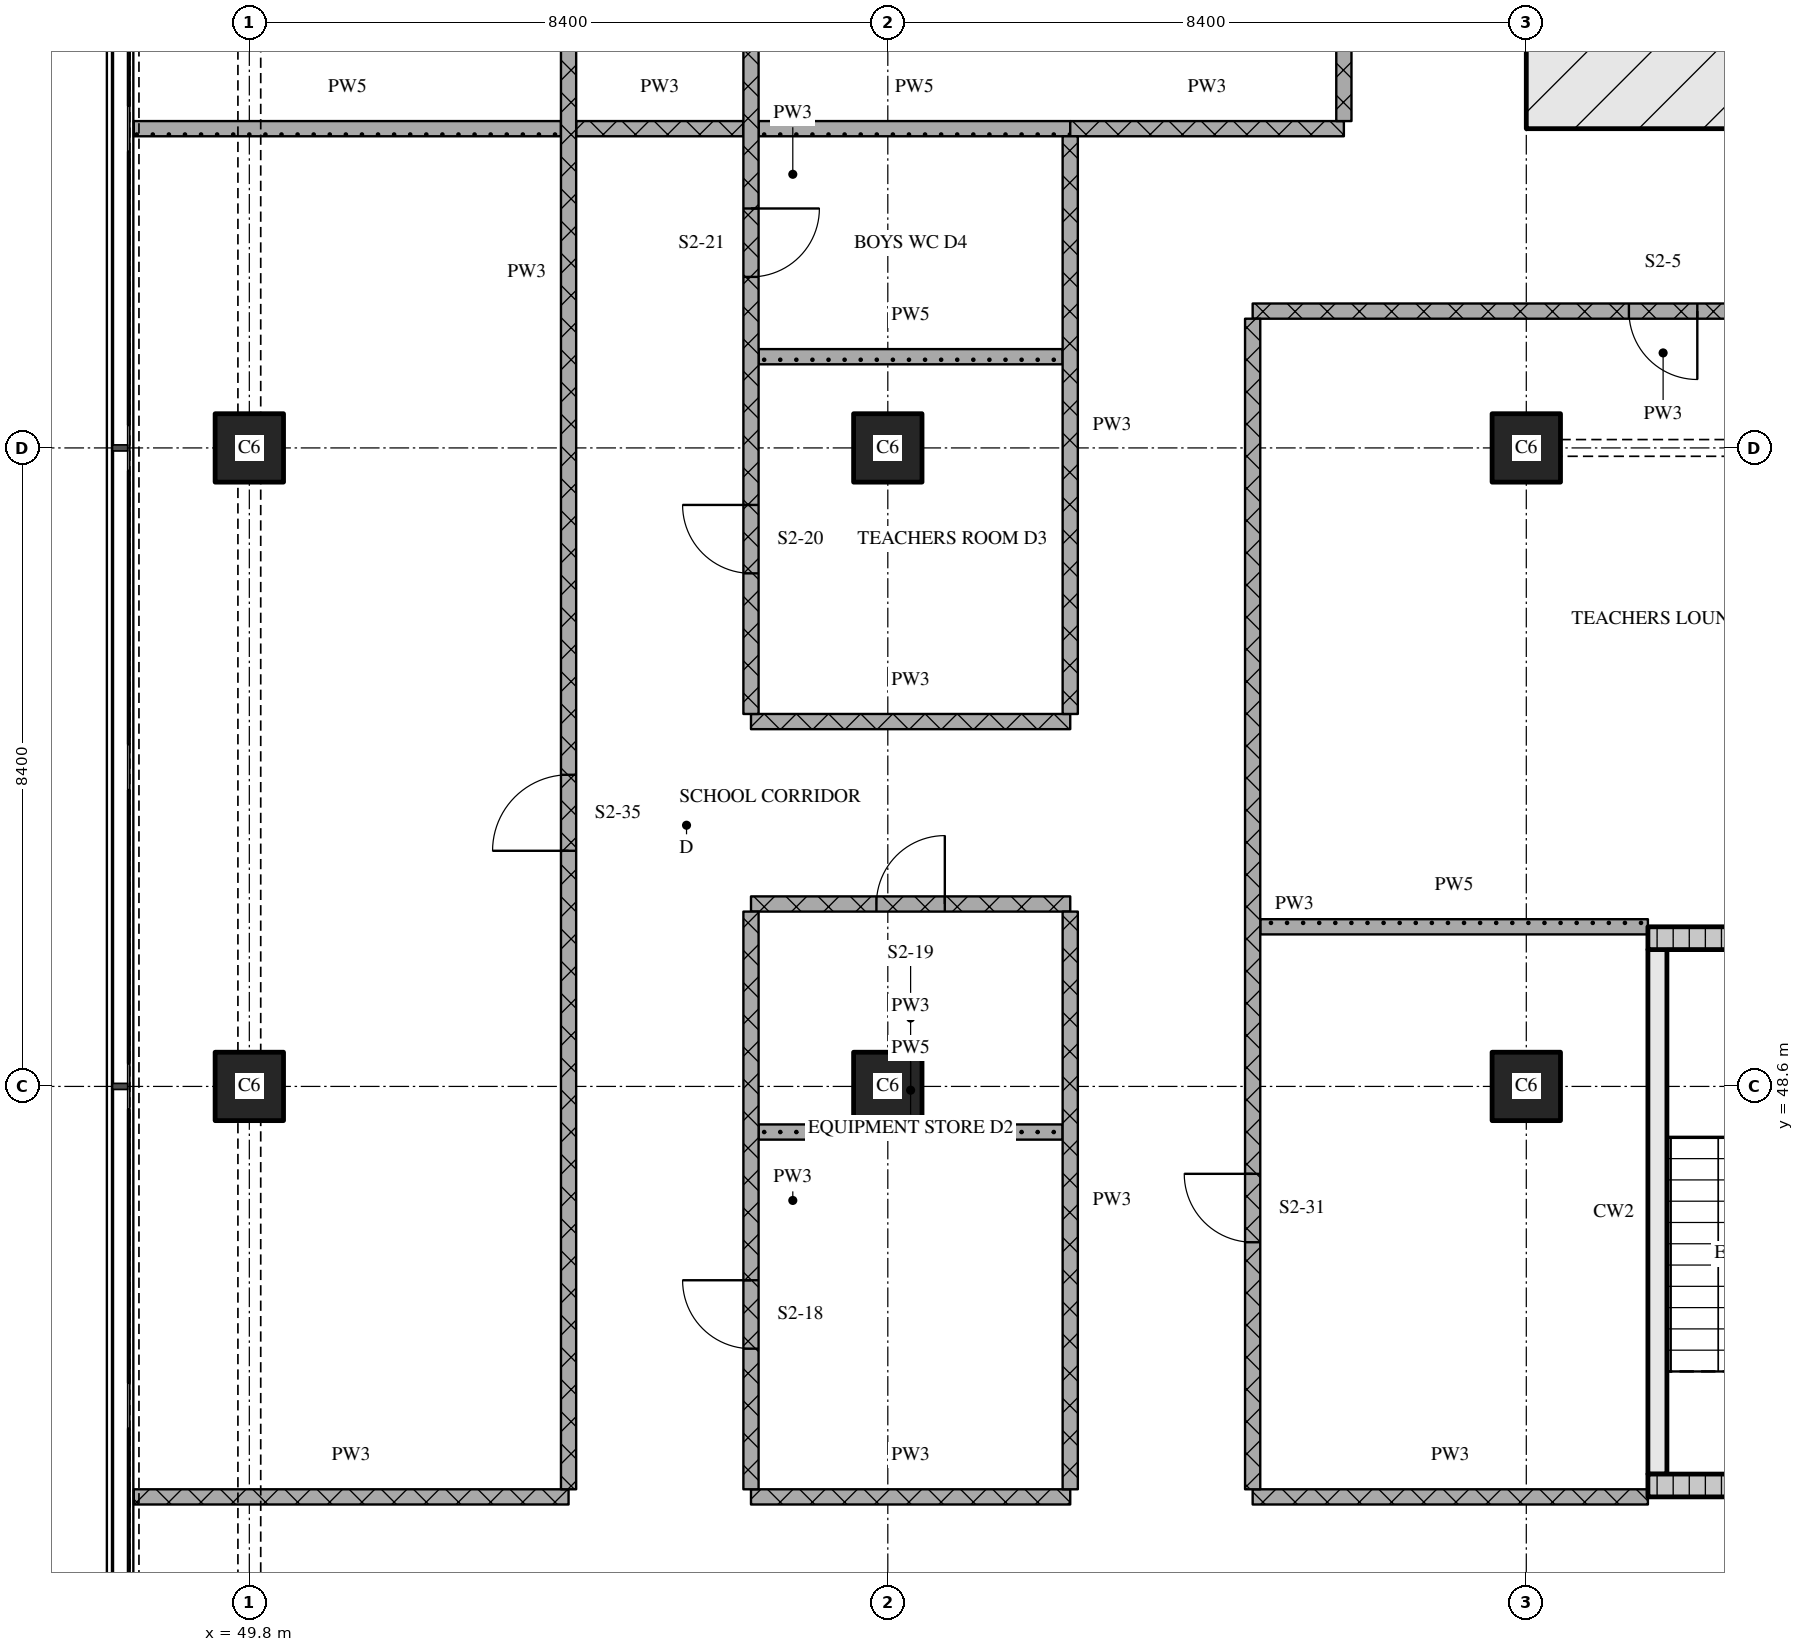
"""IFC4 building model, lengths in metres.
Left out: names, types, materials, properties, quantities, classifications, styles, units other than length and angle.
Written with IfcOpenShell. Run it as: python <this file> out.ifc"""

import sys

from ifc_helpers import new_model, si_unit, direction, frame, frame_2d, origin, origin_2d, place, context, subcontext, project, spatial, rectangle, extrude, element, fill, save


model = new_model("IFC4")
c1 = context("Model", 3, precision=1e-05, world=origin(), true_north=direction((0.0, 1.0)))
c2 = subcontext(c1, "Body", "Model", "MODEL_VIEW")
j1 = project(units=[si_unit("LENGTHUNIT", "METRE"), si_unit("PLANEANGLEUNIT", "RADIAN")], contexts=[c1])
p1 = place(None, origin())
s1 = spatial("IfcSite", under=j1, at=p1, CompositionType="ELEMENT")
p2 = place(p1, origin())
s2 = spatial("IfcBuilding", under=s1, at=p2, CompositionType="ELEMENT")
p3 = place(p2, frame((0.0, 0.0, 28.2)))
s3 = spatial("IfcBuildingStorey", under=s2, at=p3, CompositionType="ELEMENT", Elevation=28.2)
for number, where, z_axis, x_axis in (
    (1, (49.8, 48.6, 0.0), (0.0, 0.0, 1.0), (1.0, 0.0, 0.0)),
    (2, (49.8, 57.0, 0.0), (0.0, 0.0, 1.0), (1.0, 0.0, 0.0)),
    (3, (58.2, 48.6, 0.0), (0.0, 0.0, 1.0), (1.0, 0.0, 0.0)),
    (4, (58.2, 57.0, 0.0), (0.0, 0.0, 1.0), (1.0, 0.0, 0.0)),
    (5, (66.6, 48.6, 0.0), (0.0, 0.0, 1.0), (1.0, 0.0, 0.0)),
    (6, (66.6, 57.0, 0.0), (0.0, 0.0, 1.0), (1.0, 0.0, 0.0)),
):
    element("IfcColumn", number, at=place(p3, frame(where, z_axis=z_axis, x_axis=x_axis)), inside=s3, PredefinedType="COLUMN", context=c2, shape_type="SweptSolid", body=[
        extrude(rectangle(XDim=0.9, YDim=0.9, at=origin_2d()), origin(), (0.0, 0.0, 1.0), 4.5),
    ])
p4 = place(p3, frame((66.6, 61.8, 0.0), z_axis=(0.0, 0.0, 1.0), x_axis=(1.0, 0.0, 0.0)))
e7 = element("IfcWall", 7, at=p4, inside=s3, PredefinedType="SOLIDWALL", context=c2, shape_type="SweptSolid", body=[
    extrude(rectangle(XDim=42.0, YDim=1.2, at=frame_2d((21.0, 0.0))), origin(), (0.0, 0.0, 1.0), 4.2),
])
p5 = place(p4, frame((21.35, 0.0, 0.0)))
e8 = element("IfcOpeningElement", 8, at=p5, cuts=e7, PredefinedType="OPENING", context=c2, shape_type="SweptSolid", body=[
    extrude(rectangle(XDim=1.8, YDim=2.1, at=frame_2d((0.9, 1.05))), frame((0.0, 0.61, 0.0), z_axis=(0.0, -1.0, 0.0), x_axis=(1.0, 0.0, 0.0)), (0.0, 0.0, 1.0), 1.22),
])
p6 = place(p3, frame((68.2, 43.35, 0.0), z_axis=(0.0, 0.0, 1.0), x_axis=(1.0, 0.0, 0.0)))
e9 = element("IfcWall", 9, at=p6, inside=s3, PredefinedType="SOLIDWALL", context=c2, shape_type="SweptSolid", body=[
    extrude(rectangle(XDim=5.6, YDim=0.3, at=frame_2d((2.8, 0.0))), origin(), (0.0, 0.0, 1.0), 4.2),
])
p7 = place(p6, frame((3.875, 0.0, 0.0)))
e10 = element("IfcOpeningElement", 10, at=p7, cuts=e9, PredefinedType="OPENING", context=c2, shape_type="SweptSolid", body=[
    extrude(rectangle(XDim=1.0, YDim=2.1, at=frame_2d((0.5, 1.05))), frame((0.0, 0.16, 0.0), z_axis=(0.0, -1.0, 0.0), x_axis=(1.0, 0.0, 0.0)), (0.0, 0.0, 1.0), 0.32),
])
p8 = place(p3, frame((68.325, 43.5, 0.0), z_axis=(0.0, 0.0, 1.0), x_axis=(0.0, 1.0, 0.0)))
e11 = element("IfcWall", 11, at=p8, inside=s3, PredefinedType="SOLIDWALL", context=c2, shape_type="SweptSolid", body=[
    extrude(rectangle(XDim=6.9, YDim=0.25, at=frame_2d((3.45, 0.0))), origin(), (0.0, 0.0, 1.0), 4.2),
])
p9 = place(p3, frame((68.2, 50.55, 0.0), z_axis=(0.0, 0.0, 1.0), x_axis=(1.0, 0.0, 0.0)))
e12 = element("IfcWall", 12, at=p9, inside=s3, PredefinedType="SOLIDWALL", context=c2, shape_type="SweptSolid", body=[
    extrude(rectangle(XDim=5.6, YDim=0.3, at=frame_2d((2.8, 0.0))), origin(), (0.0, 0.0, 1.0), 4.2),
])
p10 = place(p3, frame((48.28, 43.2, 0.0), z_axis=(0.0, 0.0, 1.0), x_axis=(1.0, 0.0, 0.0)))
e13 = element("IfcWall", 13, at=p10, inside=s3, PredefinedType="PARTITIONING", context=c2, shape_type="SweptSolid", body=[
    extrude(rectangle(XDim=5.72, YDim=0.2, at=frame_2d((2.86, 0.0))), origin(), (0.0, 0.0, 1.0), 4.2),
])
p11 = place(p3, frame((56.4, 43.2, 0.0), z_axis=(0.0, 0.0, 1.0), x_axis=(1.0, 0.0, 0.0)))
e14 = element("IfcWall", 14, at=p11, inside=s3, PredefinedType="PARTITIONING", context=c2, shape_type="SweptSolid", body=[
    extrude(rectangle(XDim=4.2, YDim=0.2, at=frame_2d((2.1, 0.0))), origin(), (0.0, 0.0, 1.0), 4.2),
])
p12 = place(p3, frame((63.0, 43.2, 0.0), z_axis=(0.0, 0.0, 1.0), x_axis=(1.0, 0.0, 0.0)))
e15 = element("IfcWall", 15, at=p12, inside=s3, PredefinedType="PARTITIONING", context=c2, shape_type="SweptSolid", body=[
    extrude(rectangle(XDim=5.2, YDim=0.2, at=frame_2d((2.6, 0.0))), origin(), (0.0, 0.0, 1.0), 4.2),
])
p13 = place(p3, frame((56.5, 48.0, 0.0), z_axis=(0.0, 0.0, 1.0), x_axis=(1.0, 0.0, 0.0)))
e16 = element("IfcWall", 16, at=p13, inside=s3, PredefinedType="PARTITIONING", context=c2, shape_type="SweptSolid", body=[
    extrude(rectangle(XDim=4.0, YDim=0.2, at=frame_2d((2.0, 0.0))), origin(), (0.0, 0.0, 1.0), 4.2),
])
p14 = place(p3, frame((63.1, 50.7, 0.0), z_axis=(0.0, 0.0, 1.0), x_axis=(1.0, 0.0, 0.0)))
e17 = element("IfcWall", 17, at=p14, inside=s3, PredefinedType="PARTITIONING", context=c2, shape_type="SweptSolid", body=[
    extrude(rectangle(XDim=5.1, YDim=0.2, at=frame_2d((2.55, 0.0))), origin(), (0.0, 0.0, 1.0), 4.2),
])
p15 = place(p3, frame((60.6, 51.0, 0.0), z_axis=(0.0, 0.0, 1.0), x_axis=(-1.0, 0.0, 0.0)))
e18 = element("IfcWall", 18, at=p15, inside=s3, PredefinedType="PARTITIONING", context=c2, shape_type="SweptSolid", body=[
    extrude(rectangle(XDim=4.2, YDim=0.2, at=frame_2d((2.1, 0.0))), origin(), (0.0, 0.0, 1.0), 4.2),
])
p16 = place(p15, frame((1.65, 0.0, 0.0)))
e19 = element("IfcOpeningElement", 19, at=p16, cuts=e18, PredefinedType="OPENING", context=c2, shape_type="SweptSolid", body=[
    extrude(rectangle(XDim=0.9, YDim=2.1, at=frame_2d((0.45, 1.05))), frame((0.0, 0.11, 0.0), z_axis=(0.0, -1.0, 0.0), x_axis=(1.0, 0.0, 0.0)), (0.0, 0.0, 1.0), 0.22),
])
p17 = place(p3, frame((56.4, 53.4, 0.0), z_axis=(0.0, 0.0, 1.0), x_axis=(1.0, 0.0, 0.0)))
e20 = element("IfcWall", 20, at=p17, inside=s3, PredefinedType="PARTITIONING", context=c2, shape_type="SweptSolid", body=[
    extrude(rectangle(XDim=4.2, YDim=0.2, at=frame_2d((2.1, 0.0))), origin(), (0.0, 0.0, 1.0), 4.2),
])
p18 = place(p3, frame((56.5, 58.2, 0.0), z_axis=(0.0, 0.0, 1.0), x_axis=(1.0, 0.0, 0.0)))
e21 = element("IfcWall", 21, at=p18, inside=s3, PredefinedType="PARTITIONING", context=c2, shape_type="SweptSolid", body=[
    extrude(rectangle(XDim=4.0, YDim=0.2, at=frame_2d((2.0, 0.0))), origin(), (0.0, 0.0, 1.0), 4.2),
])
p19 = place(p3, frame((73.8, 58.8, 0.0), z_axis=(0.0, 0.0, 1.0), x_axis=(-1.0, 0.0, 0.0)))
e22 = element("IfcWall", 22, at=p19, inside=s3, PredefinedType="PARTITIONING", context=c2, shape_type="SweptSolid", body=[
    extrude(rectangle(XDim=10.8, YDim=0.2, at=frame_2d((5.4, 0.0))), origin(), (0.0, 0.0, 1.0), 4.2),
])
p20 = place(p19, frame((4.95, 0.0, 0.0)))
e23 = element("IfcOpeningElement", 23, at=p20, cuts=e22, PredefinedType="OPENING", context=c2, shape_type="SweptSolid", body=[
    extrude(rectangle(XDim=0.9, YDim=2.1, at=frame_2d((0.45, 1.05))), frame((0.0, 0.11, 0.0), z_axis=(0.0, -1.0, 0.0), x_axis=(1.0, 0.0, 0.0)), (0.0, 0.0, 1.0), 0.22),
])
p21 = place(p3, frame((54.1, 61.2, 0.0), z_axis=(0.0, 0.0, 1.0), x_axis=(1.0, 0.0, 0.0)))
e24 = element("IfcWall", 24, at=p21, inside=s3, PredefinedType="PARTITIONING", context=c2, shape_type="SweptSolid", body=[
    extrude(rectangle(XDim=2.2, YDim=0.2, at=frame_2d((1.1, 0.0))), origin(), (0.0, 0.0, 1.0), 4.2),
])
p22 = place(p3, frame((60.6, 61.2, 0.0), z_axis=(0.0, 0.0, 1.0), x_axis=(1.0, 0.0, 0.0)))
e25 = element("IfcWall", 25, at=p22, inside=s3, PredefinedType="PARTITIONING", context=c2, shape_type="SweptSolid", body=[
    extrude(rectangle(XDim=3.6, YDim=0.2, at=frame_2d((1.8, 0.0))), origin(), (0.0, 0.0, 1.0), 4.2),
])
p23 = place(p3, frame((48.28, 61.2, 0.0), z_axis=(0.0, 0.0, 1.0), x_axis=(1.0, 0.0, 0.0)))
e26 = element("IfcWall", 26, at=p23, inside=s3, PredefinedType="PARTITIONING", context=c2, shape_type="SweptSolid", body=[
    extrude(rectangle(XDim=5.62, YDim=0.2, at=frame_2d((2.81, 0.0))), origin(), (0.0, 0.0, 1.0), 4.2),
])
p24 = place(p3, frame((56.5, 61.2, 0.0), z_axis=(0.0, 0.0, 1.0), x_axis=(1.0, 0.0, 0.0)))
e27 = element("IfcWall", 27, at=p24, inside=s3, PredefinedType="PARTITIONING", context=c2, shape_type="SweptSolid", body=[
    extrude(rectangle(XDim=4.1, YDim=0.2, at=frame_2d((2.05, 0.0))), origin(), (0.0, 0.0, 1.0), 4.2),
])
p25 = place(p3, frame((54.0, 43.3, 0.0), z_axis=(0.0, 0.0, 1.0), x_axis=(0.0, 1.0, 0.0)))
e28 = element("IfcWall", 28, at=p25, inside=s3, PredefinedType="PARTITIONING", context=c2, shape_type="SweptSolid", body=[
    extrude(rectangle(XDim=32.02, YDim=0.2, at=frame_2d((16.01, 0.0))), origin(), (0.0, 0.0, 1.0), 4.2),
])
p26 = place(p25, frame((8.4, 0.0, 0.0)))
e29 = element("IfcOpeningElement", 29, at=p26, cuts=e28, PredefinedType="OPENING", context=c2, shape_type="SweptSolid", body=[
    extrude(rectangle(XDim=1.0, YDim=2.1, at=frame_2d((0.5, 1.05))), frame((0.0, 0.11, 0.0), z_axis=(0.0, -1.0, 0.0), x_axis=(1.0, 0.0, 0.0)), (0.0, 0.0, 1.0), 0.22),
])
p27 = place(p25, frame((23.292, 0.0, 0.0)))
e30 = element("IfcOpeningElement", 30, at=p27, cuts=e28, PredefinedType="OPENING", context=c2, shape_type="SweptSolid", body=[
    extrude(rectangle(XDim=1.0, YDim=2.1, at=frame_2d((0.5, 1.05))), frame((0.0, 0.11, 0.0), z_axis=(0.0, -1.0, 0.0), x_axis=(1.0, 0.0, 0.0)), (0.0, 0.0, 1.0), 0.22),
])
p28 = place(p3, frame((56.4, 50.9, 0.0), z_axis=(0.0, 0.0, 1.0), x_axis=(0.0, -1.0, 0.0)))
e31 = element("IfcWall", 31, at=p28, inside=s3, PredefinedType="PARTITIONING", context=c2, shape_type="SweptSolid", body=[
    extrude(rectangle(XDim=7.6, YDim=0.2, at=frame_2d((3.8, 0.0))), origin(), (0.0, 0.0, 1.0), 4.2),
])
p29 = place(p28, frame((4.85, 0.0, 0.0)))
e32 = element("IfcOpeningElement", 32, at=p29, cuts=e31, PredefinedType="OPENING", context=c2, shape_type="SweptSolid", body=[
    extrude(rectangle(XDim=0.9, YDim=2.1, at=frame_2d((0.45, 1.05))), frame((0.0, 0.11, 0.0), z_axis=(0.0, -1.0, 0.0), x_axis=(1.0, 0.0, 0.0)), (0.0, 0.0, 1.0), 0.22),
])
p30 = place(p3, frame((56.4, 67.7, 0.0), z_axis=(0.0, 0.0, 1.0), x_axis=(0.0, -1.0, 0.0)))
e33 = element("IfcWall", 33, at=p30, inside=s3, PredefinedType="PARTITIONING", context=c2, shape_type="SweptSolid", body=[
    extrude(rectangle(XDim=14.2, YDim=0.2, at=frame_2d((7.1, 0.0))), origin(), (0.0, 0.0, 1.0), 4.2),
])
p31 = place(p30, frame((7.55, 0.0, 0.0)))
e34 = element("IfcOpeningElement", 34, at=p31, cuts=e33, PredefinedType="OPENING", context=c2, shape_type="SweptSolid", body=[
    extrude(rectangle(XDim=0.9, YDim=2.1, at=frame_2d((0.45, 1.05))), frame((0.0, 0.11, 0.0), z_axis=(0.0, -1.0, 0.0), x_axis=(1.0, 0.0, 0.0)), (0.0, 0.0, 1.0), 0.22),
])
p32 = place(p30, frame((11.45, 0.0, 0.0)))
e35 = element("IfcOpeningElement", 35, at=p32, cuts=e33, PredefinedType="OPENING", context=c2, shape_type="SweptSolid", body=[
    extrude(rectangle(XDim=0.9, YDim=2.1, at=frame_2d((0.45, 1.05))), frame((0.0, 0.11, 0.0), z_axis=(0.0, -1.0, 0.0), x_axis=(1.0, 0.0, 0.0)), (0.0, 0.0, 1.0), 0.22),
])
p33 = place(p3, frame((60.6, 50.9, 0.0), z_axis=(0.0, 0.0, 1.0), x_axis=(0.0, -1.0, 0.0)))
e36 = element("IfcWall", 36, at=p33, inside=s3, PredefinedType="PARTITIONING", context=c2, shape_type="SweptSolid", body=[
    extrude(rectangle(XDim=7.6, YDim=0.2, at=frame_2d((3.8, 0.0))), origin(), (0.0, 0.0, 1.0), 4.2),
])
p34 = place(p3, frame((60.6, 61.1, 0.0), z_axis=(0.0, 0.0, 1.0), x_axis=(0.0, -1.0, 0.0)))
e37 = element("IfcWall", 37, at=p34, inside=s3, PredefinedType="PARTITIONING", context=c2, shape_type="SweptSolid", body=[
    extrude(rectangle(XDim=7.6, YDim=0.2, at=frame_2d((3.8, 0.0))), origin(), (0.0, 0.0, 1.0), 4.2),
])
p35 = place(p3, frame((63.0, 58.7, 0.0), z_axis=(0.0, 0.0, 1.0), x_axis=(0.0, -1.0, 0.0)))
e38 = element("IfcWall", 38, at=p35, inside=s3, PredefinedType="PARTITIONING", context=c2, shape_type="SweptSolid", body=[
    extrude(rectangle(XDim=15.4, YDim=0.2, at=frame_2d((7.7, 0.0))), origin(), (0.0, 0.0, 1.0), 4.2),
])
p36 = place(p35, frame((11.25, 0.0, 0.0)))
e39 = element("IfcOpeningElement", 39, at=p36, cuts=e38, PredefinedType="OPENING", context=c2, shape_type="SweptSolid", body=[
    extrude(rectangle(XDim=0.9, YDim=2.1, at=frame_2d((0.45, 1.05))), frame((0.0, 0.11, 0.0), z_axis=(0.0, -1.0, 0.0), x_axis=(1.0, 0.0, 0.0)), (0.0, 0.0, 1.0), 0.22),
])
p37 = place(p3, frame((64.2, 67.7, 0.0), z_axis=(0.0, 0.0, 1.0), x_axis=(0.0, -1.0, 0.0)))
e40 = element("IfcWall", 40, at=p37, inside=s3, PredefinedType="PARTITIONING", context=c2, shape_type="SweptSolid", body=[
    extrude(rectangle(XDim=6.4, YDim=0.2, at=frame_2d((3.2, 0.0))), origin(), (0.0, 0.0, 1.0), 4.2),
])
p38 = place(p16, origin())
e41 = element("IfcDoor", 41, at=p38, inside=s3, OperationType="SINGLE_SWING_RIGHT", PredefinedType="DOOR", context=c2, shape_type="SweptSolid", body=[
    extrude(rectangle(XDim=0.9, YDim=2.1, at=frame_2d((0.45, 1.05))), frame((0.0, 0.025, 0.0), z_axis=(0.0, -1.0, 0.0), x_axis=(1.0, 0.0, 0.0)), (0.0, 0.0, 1.0), 0.05),
])
fill(e19, e41)
p39 = place(p20, origin())
e42 = element("IfcDoor", 42, at=p39, inside=s3, OperationType="SINGLE_SWING_LEFT", PredefinedType="DOOR", context=c2, shape_type="SweptSolid", body=[
    extrude(rectangle(XDim=0.9, YDim=2.1, at=frame_2d((0.45, 1.05))), frame((0.0, 0.025, 0.0), z_axis=(0.0, -1.0, 0.0), x_axis=(1.0, 0.0, 0.0)), (0.0, 0.0, 1.0), 0.05),
])
fill(e23, e42)
p40 = place(p26, origin())
e43 = element("IfcDoor", 43, at=p40, inside=s3, OperationType="SINGLE_SWING_LEFT", PredefinedType="DOOR", context=c2, shape_type="SweptSolid", body=[
    extrude(rectangle(XDim=1.0, YDim=2.1, at=frame_2d((0.5, 1.05))), frame((0.0, 0.025, 0.0), z_axis=(0.0, -1.0, 0.0), x_axis=(1.0, 0.0, 0.0)), (0.0, 0.0, 1.0), 0.05),
])
fill(e29, e43)
p41 = place(p29, origin())
e44 = element("IfcDoor", 44, at=p41, inside=s3, OperationType="SINGLE_SWING_RIGHT", PredefinedType="DOOR", context=c2, shape_type="SweptSolid", body=[
    extrude(rectangle(XDim=0.9, YDim=2.1, at=frame_2d((0.45, 1.05))), frame((0.0, 0.025, 0.0), z_axis=(0.0, -1.0, 0.0), x_axis=(1.0, 0.0, 0.0)), (0.0, 0.0, 1.0), 0.05),
])
fill(e32, e44)
p42 = place(p31, origin())
e45 = element("IfcDoor", 45, at=p42, inside=s3, OperationType="SINGLE_SWING_LEFT", PredefinedType="DOOR", context=c2, shape_type="SweptSolid", body=[
    extrude(rectangle(XDim=0.9, YDim=2.1, at=frame_2d((0.45, 1.05))), frame((0.0, 0.025, 0.0), z_axis=(0.0, -1.0, 0.0), x_axis=(1.0, 0.0, 0.0)), (0.0, 0.0, 1.0), 0.05),
])
fill(e34, e45)
p43 = place(p32, origin())
e46 = element("IfcDoor", 46, at=p43, inside=s3, OperationType="SINGLE_SWING_RIGHT", PredefinedType="DOOR", context=c2, shape_type="SweptSolid", body=[
    extrude(rectangle(XDim=0.9, YDim=2.1, at=frame_2d((0.45, 1.05))), frame((0.0, 0.025, 0.0), z_axis=(0.0, -1.0, 0.0), x_axis=(1.0, 0.0, 0.0)), (0.0, 0.0, 1.0), 0.05),
])
fill(e35, e46)
p44 = place(p36, origin())
e47 = element("IfcDoor", 47, at=p44, inside=s3, OperationType="SINGLE_SWING_RIGHT", PredefinedType="DOOR", context=c2, shape_type="SweptSolid", body=[
    extrude(rectangle(XDim=0.9, YDim=2.1, at=frame_2d((0.45, 1.05))), frame((0.0, 0.025, 0.0), z_axis=(0.0, -1.0, 0.0), x_axis=(1.0, 0.0, 0.0)), (0.0, 0.0, 1.0), 0.05),
])
fill(e39, e47)
save(model, sys.argv[1])
